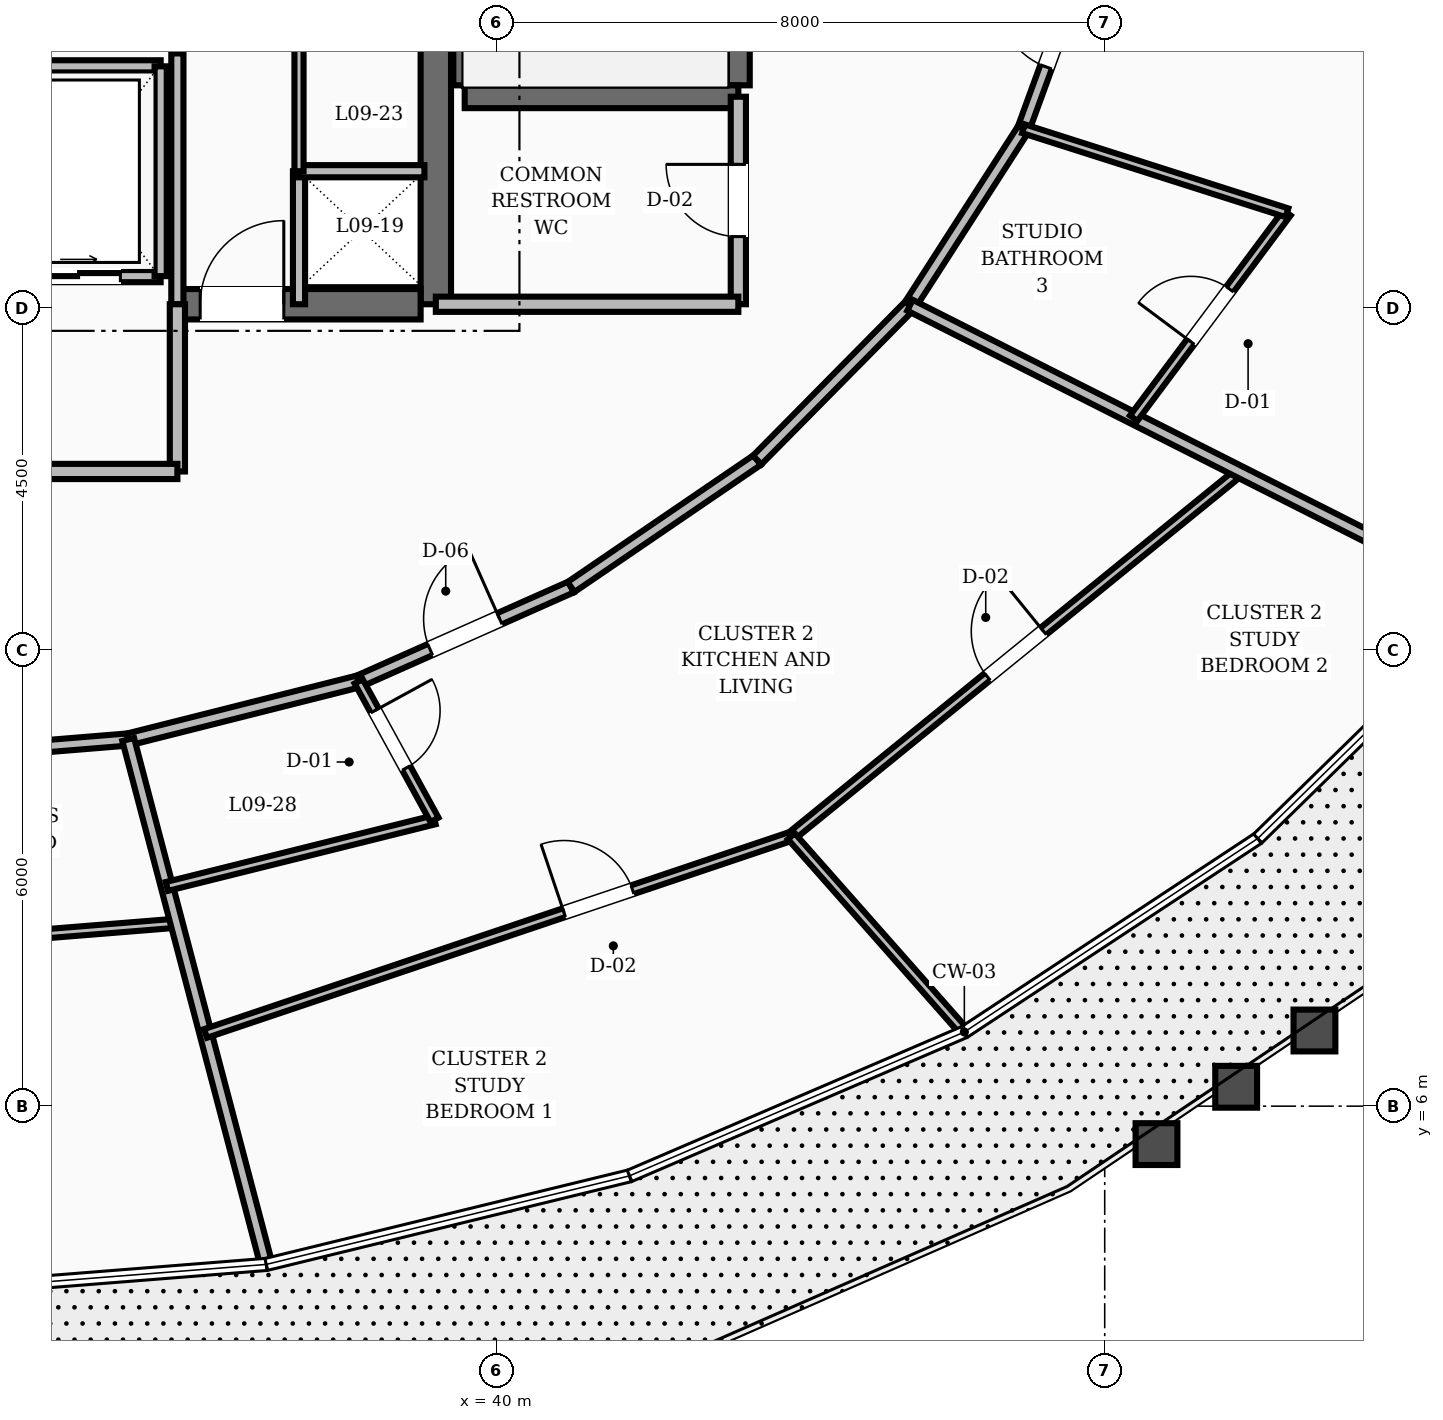
"""IFC4 building model, lengths in metres.
Left out: names, types, materials, properties, quantities, classifications, styles, units other than length and angle.
Written with IfcOpenShell. Run it as: python <this file> out.ifc"""

import sys

from ifc_helpers import new_model, si_unit, direction, frame, frame_2d, origin, place, context, subcontext, project, spatial, rectangle, extrude, element, fill, save


model = new_model("IFC4")
c1 = context("Model", 3, precision=1e-05, world=origin(), true_north=direction((0.0, 1.0)))
c2 = subcontext(c1, "Body", "Model", "MODEL_VIEW")
j1 = project(units=[si_unit("LENGTHUNIT", "METRE"), si_unit("PLANEANGLEUNIT", "RADIAN")], contexts=[c1])
p1 = place(None, origin())
s1 = spatial("IfcSite", under=j1, at=p1, CompositionType="ELEMENT")
p2 = place(p1, origin())
s2 = spatial("IfcBuilding", under=s1, at=p2, CompositionType="ELEMENT")
p3 = place(p2, frame((0.0, 0.0, 41.2)))
s3 = spatial("IfcBuildingStorey", under=s2, at=p3, CompositionType="ELEMENT", Elevation=41.2)
p4 = place(p3, frame((39.2, 16.55, 0.0), z_axis=(0.0, 0.0, 1.0), x_axis=(0.0, 1.0, 0.0)))
e1 = element("IfcWall", 1, at=p4, inside=s3, PredefinedType="SHEAR", context=c2, shape_type="SweptSolid", body=[
    extrude(rectangle(XDim=6.3, YDim=0.4, at=frame_2d((3.15, 0.0))), origin(), (0.0, 0.0, 1.0), 3.6),
])
p5 = place(p3, frame((35.8, 16.55, 0.0), z_axis=(0.0, 0.0, 1.0), x_axis=(1.0, 0.0, 0.0)))
e2 = element("IfcWall", 2, at=p5, inside=s3, PredefinedType="SHEAR", context=c2, shape_type="SweptSolid", body=[
    extrude(rectangle(XDim=3.2, YDim=0.4, at=frame_2d((1.6, 0.0))), origin(), (0.0, 0.0, 1.0), 3.6),
])
p6 = place(p5, frame((0.3, 0.0, 0.0)))
e3 = element("IfcOpeningElement", 3, at=p6, cuts=e2, PredefinedType="OPENING", context=c2, shape_type="SweptSolid", body=[
    extrude(rectangle(XDim=1.1, YDim=2.1, at=frame_2d((0.55, 1.05))), frame((0.0, 0.21, 0.0), z_axis=(0.0, -1.0, 0.0), x_axis=(1.0, 0.0, 0.0)), (0.0, 0.0, 1.0), 0.42),
])
for number, where, z_axis, x_axis in (
    (4, (43.18, 19.43, 0.0), (0.0, 0.0, 1.0), (0.0, 1.0, 0.0)),
    (5, (39.58, 19.43, 0.0), (0.0, 0.0, 1.0), (0.0, 1.0, 0.0)),
):
    element("IfcWall", number, at=place(p3, frame(where, z_axis=z_axis, x_axis=x_axis)), inside=s3, PredefinedType="SHEAR", context=c2, shape_type="SweptSolid", body=[
        extrude(rectangle(XDim=8.74, YDim=0.3, at=frame_2d((4.37, 0.0))), origin(), (0.0, 0.0, 1.0), 3.6),
    ])
p7 = place(p3, frame((39.58, 19.28, 0.0), z_axis=(0.0, 0.0, 1.0), x_axis=(1.0, 0.0, 0.0)))
e6 = element("IfcWall", 6, at=p7, inside=s3, PredefinedType="SHEAR", context=c2, shape_type="SweptSolid", body=[
    extrude(rectangle(XDim=3.6, YDim=0.3, at=frame_2d((1.8, 0.0))), origin(), (0.0, 0.0, 1.0), 3.6),
])
p8 = place(p3, frame((43.18, 16.55, 0.0), z_axis=(0.0, 0.0, 1.0), x_axis=(0.0, 1.0, 0.0)))
e7 = element("IfcWall", 7, at=p8, inside=s3, PredefinedType="SOLIDWALL", context=c2, shape_type="SweptSolid", body=[
    extrude(rectangle(XDim=2.73, YDim=0.2, at=frame_2d((1.365, 0.0))), origin(), (0.0, 0.0, 1.0), 2.61),
])
p9 = place(p8, frame((0.89, 0.0, 0.0)))
e8 = element("IfcOpeningElement", 8, at=p9, cuts=e7, PredefinedType="OPENING", context=c2, shape_type="SweptSolid", body=[
    extrude(rectangle(XDim=0.95, YDim=2.1, at=frame_2d((0.475, 1.05))), frame((0.0, 0.11, 0.0), z_axis=(0.0, -1.0, 0.0), x_axis=(1.0, 0.0, 0.0)), (0.0, 0.0, 1.0), 0.22),
])
p10 = place(p3, frame((39.2, 16.55, 0.0), z_axis=(0.0, 0.0, 1.0), x_axis=(1.0, 0.0, 0.0)))
e9 = element("IfcWall", 9, at=p10, inside=s3, PredefinedType="SOLIDWALL", context=c2, shape_type="SweptSolid", body=[
    extrude(rectangle(XDim=3.98, YDim=0.2, at=frame_2d((1.99, 0.0))), origin(), (0.0, 0.0, 1.0), 2.61),
])
p11 = place(p3, frame((35.8, 16.55, 0.0), z_axis=(0.0, 0.0, 1.0), x_axis=(0.0, 1.0, 0.0)))
e10 = element("IfcWall", 10, at=p11, inside=s3, PredefinedType="SOLIDWALL", context=c2, shape_type="SweptSolid", body=[
    extrude(rectangle(XDim=3.3, YDim=0.16, at=frame_2d((1.65, 0.0))), origin(), (0.0, 0.0, 1.0), 2.61),
])
p12 = place(p3, frame((37.4, 16.55, 0.0), z_axis=(0.0, 0.0, 1.0), x_axis=(0.0, 1.0, 0.0)))
e11 = element("IfcWall", 11, at=p12, inside=s3, PredefinedType="SOLIDWALL", context=c2, shape_type="SweptSolid", body=[
    extrude(rectangle(XDim=1.75, YDim=0.16, at=frame_2d((0.875, 0.0))), origin(), (0.0, 0.0, 1.0), 2.61),
])
p13 = place(p3, frame((35.8, 14.35, 0.0), z_axis=(0.0, 0.0, 1.0), x_axis=(0.0, 1.0, 0.0)))
e12 = element("IfcWall", 12, at=p13, inside=s3, PredefinedType="SOLIDWALL", context=c2, shape_type="SweptSolid", body=[
    extrude(rectangle(XDim=2.2, YDim=0.2, at=frame_2d((1.1, 0.0))), origin(), (0.0, 0.0, 1.0), 2.61),
])
p14 = place(p3, frame((28.2, 14.35, 0.0), z_axis=(0.0, 0.0, 1.0), x_axis=(1.0, 0.0, 0.0)))
e13 = element("IfcWall", 13, at=p14, inside=s3, PredefinedType="SOLIDWALL", context=c2, shape_type="SweptSolid", body=[
    extrude(rectangle(XDim=7.6, YDim=0.2, at=frame_2d((3.8, 0.0))), origin(), (0.0, 0.0, 1.0), 2.61),
])
p15 = place(p14, frame((3.2, 0.0, 0.0)))
e14 = element("IfcOpeningElement", 14, at=p15, cuts=e13, PredefinedType="OPENING", context=c2, shape_type="SweptSolid", body=[
    extrude(rectangle(XDim=1.2, YDim=2.1, at=frame_2d((0.6, 1.05))), frame((0.0, 0.11, 0.0), z_axis=(0.0, -1.0, 0.0), x_axis=(1.0, 0.0, 0.0)), (0.0, 0.0, 1.0), 0.22),
])
p16 = place(p3, frame((28.42, 16.92, 0.0), z_axis=(0.0, 0.0, 1.0), x_axis=(1.0, 0.0, 0.0)))
e15 = element("IfcWall", 15, at=p16, inside=s3, PredefinedType="SOLIDWALL", context=c2, shape_type="SweptSolid", body=[
    extrude(rectangle(XDim=7.16, YDim=0.16, at=frame_2d((3.58, 0.0))), origin(), (0.0, 0.0, 1.0), 2.61),
])
p17 = place(p16, frame((0.53, 0.0, 0.0)))
e16 = element("IfcOpeningElement", 16, at=p17, cuts=e15, PredefinedType="OPENING", context=c2, shape_type="SweptSolid", body=[
    extrude(rectangle(XDim=1.1, YDim=2.15, at=frame_2d((0.55, 1.075))), frame((0.0, 0.09, 0.0), z_axis=(0.0, -1.0, 0.0), x_axis=(1.0, 0.0, 0.0)), (0.0, 0.0, 1.0), 0.18),
])
p18 = place(p16, frame((3.03, 0.0, 0.0)))
e17 = element("IfcOpeningElement", 17, at=p18, cuts=e15, PredefinedType="OPENING", context=c2, shape_type="SweptSolid", body=[
    extrude(rectangle(XDim=1.1, YDim=2.15, at=frame_2d((0.55, 1.075))), frame((0.0, 0.09, 0.0), z_axis=(0.0, -1.0, 0.0), x_axis=(1.0, 0.0, 0.0)), (0.0, 0.0, 1.0), 0.18),
])
p19 = place(p16, frame((5.53, 0.0, 0.0)))
e18 = element("IfcOpeningElement", 18, at=p19, cuts=e15, PredefinedType="OPENING", context=c2, shape_type="SweptSolid", body=[
    extrude(rectangle(XDim=1.1, YDim=2.15, at=frame_2d((0.55, 1.075))), frame((0.0, 0.09, 0.0), z_axis=(0.0, -1.0, 0.0), x_axis=(1.0, 0.0, 0.0)), (0.0, 0.0, 1.0), 0.18),
])
p20 = place(p3, frame((28.42, 19.68, 0.0), z_axis=(0.0, 0.0, 1.0), x_axis=(1.0, 0.0, 0.0)))
e19 = element("IfcWall", 19, at=p20, inside=s3, PredefinedType="SOLIDWALL", context=c2, shape_type="SweptSolid", body=[
    extrude(rectangle(XDim=7.16, YDim=0.16, at=frame_2d((3.58, 0.0))), origin(), (0.0, 0.0, 1.0), 2.61),
])
p21 = place(p3, frame((35.58, 16.92, 0.0), z_axis=(0.0, 0.0, 1.0), x_axis=(0.0, 1.0, 0.0)))
e20 = element("IfcWall", 20, at=p21, inside=s3, PredefinedType="SOLIDWALL", context=c2, shape_type="SweptSolid", body=[
    extrude(rectangle(XDim=2.76, YDim=0.16, at=frame_2d((1.38, 0.0))), origin(), (0.0, 0.0, 1.0), 2.61),
])
p22 = place(p3, frame((37.4, 18.3, 0.0), z_axis=(0.0, 0.0, 1.0), x_axis=(1.0, 0.0, 0.0)))
e21 = element("IfcWall", 21, at=p22, inside=s3, PredefinedType="SOLIDWALL", context=c2, shape_type="SweptSolid", body=[
    extrude(rectangle(XDim=1.65, YDim=0.16, at=frame_2d((0.825, 0.0))), origin(), (0.0, 0.0, 1.0), 2.61),
])
p23 = place(p3, frame((37.4, 18.3, 0.0), z_axis=(0.0, 0.0, 1.0), x_axis=(0.0, 1.0, 0.0)))
e22 = element("IfcWall", 22, at=p23, inside=s3, PredefinedType="PARTITIONING", context=c2, shape_type="SweptSolid", body=[
    extrude(rectangle(XDim=4.45, YDim=0.12, at=frame_2d((2.225, 0.0))), origin(), (0.0, 0.0, 1.0), 2.61),
])
p24 = place(p23, frame((1.75, 0.0, 0.0)))
e23 = element("IfcOpeningElement", 23, at=p24, cuts=e22, PredefinedType="OPENING", context=c2, shape_type="SweptSolid", body=[
    extrude(rectangle(XDim=0.95, YDim=2.1, at=frame_2d((0.475, 1.05))), frame((0.0, 0.07, 0.0), z_axis=(0.0, -1.0, 0.0), x_axis=(1.0, 0.0, 0.0)), (0.0, 0.0, 1.0), 0.14),
])
p25 = place(p3, frame((32.0, 10.566, 0.0), z_axis=(0.0, 0.0, 1.0), x_axis=(0.996661331307, 0.081646743207, 0.0)))
e24 = element("IfcWall", 24, at=p25, inside=s3, PredefinedType="SOLIDWALL", context=c2, shape_type="SweptSolid", body=[
    extrude(rectangle(XDim=3.164, YDim=0.16, at=frame_2d((1.582, 0.0))), origin(), (0.0, 0.0, 1.0), 2.61),
])
p26 = place(p3, frame((35.153, 10.824, 0.0), z_axis=(0.0, 0.0, 1.0), x_axis=(0.969653665365, 0.244482656326, 0.0)))
e25 = element("IfcWall", 25, at=p26, inside=s3, PredefinedType="SOLIDWALL", context=c2, shape_type="SweptSolid", body=[
    extrude(rectangle(XDim=3.127, YDim=0.16, at=frame_2d((1.563, 0.0))), origin(), (0.0, 0.0, 1.0), 2.61),
])
p27 = place(p3, frame((38.185, 11.589, 0.0), z_axis=(0.0, 0.0, 1.0), x_axis=(0.913860932409, 0.406027334321, 0.0)))
e26 = element("IfcWall", 26, at=p27, inside=s3, PredefinedType="SOLIDWALL", context=c2, shape_type="SweptSolid", body=[
    extrude(rectangle(XDim=3.058, YDim=0.16, at=frame_2d((1.529, 0.0))), origin(), (0.0, 0.0, 1.0), 2.61),
])
p28 = place(p27, frame((1.029, 0.0, 0.0)))
e27 = element("IfcOpeningElement", 27, at=p28, cuts=e26, PredefinedType="OPENING", context=c2, shape_type="SweptSolid", body=[
    extrude(rectangle(XDim=1.0, YDim=2.1, at=frame_2d((0.5, 1.05))), frame((0.0, 0.09, 0.0), z_axis=(0.0, -1.0, 0.0), x_axis=(1.0, 0.0, 0.0)), (0.0, 0.0, 1.0), 0.18),
])
p29 = place(p3, frame((40.979, 12.83, 0.0), z_axis=(0.0, 0.0, 1.0), x_axis=(0.826112340767, 0.563505457323, 0.0)))
e28 = element("IfcWall", 28, at=p29, inside=s3, PredefinedType="SOLIDWALL", context=c2, shape_type="SweptSolid", body=[
    extrude(rectangle(XDim=2.965, YDim=0.16, at=frame_2d((1.482, 0.0))), origin(), (0.0, 0.0, 1.0), 2.61),
])
p30 = place(p3, frame((43.428, 14.501, 0.0), z_axis=(0.0, 0.0, 1.0), x_axis=(0.702569520063, 0.711615113301, 0.0)))
e29 = element("IfcWall", 29, at=p30, inside=s3, PredefinedType="SOLIDWALL", context=c2, shape_type="SweptSolid", body=[
    extrude(rectangle(XDim=2.861, YDim=0.16, at=frame_2d((1.43, 0.0))), origin(), (0.0, 0.0, 1.0), 2.61),
])
p31 = place(p3, frame((45.438, 16.537, 0.0), z_axis=(0.0, 0.0, 1.0), x_axis=(0.540891657444, 0.841092274907, 0.0)))
e30 = element("IfcWall", 30, at=p31, inside=s3, PredefinedType="SOLIDWALL", context=c2, shape_type="SweptSolid", body=[
    extrude(rectangle(XDim=2.761, YDim=0.16, at=frame_2d((1.38, 0.0))), origin(), (0.0, 0.0, 1.0), 2.61),
])
p32 = place(p3, frame((46.932, 18.859, 0.0), z_axis=(0.0, 0.0, 1.0), x_axis=(0.342882618672, 0.939378257047, 0.0)))
e31 = element("IfcWall", 31, at=p32, inside=s3, PredefinedType="SOLIDWALL", context=c2, shape_type="SweptSolid", body=[
    extrude(rectangle(XDim=2.683, YDim=0.16, at=frame_2d((1.341, 0.0))), origin(), (0.0, 0.0, 1.0), 2.61),
])
p33 = place(p32, frame((0.866, 0.0, 0.0)))
e32 = element("IfcOpeningElement", 32, at=p33, cuts=e31, PredefinedType="OPENING", context=c2, shape_type="SweptSolid", body=[
    extrude(rectangle(XDim=0.95, YDim=2.1, at=frame_2d((0.475, 1.05))), frame((0.0, 0.09, 0.0), z_axis=(0.0, -1.0, 0.0), x_axis=(1.0, 0.0, 0.0)), (0.0, 0.0, 1.0), 0.18),
])
p34 = place(p3, frame((32.0, 8.102, 0.0), z_axis=(0.0, 0.0, 1.0), x_axis=(0.996766693578, 0.080350224477, 0.0)))
e33 = element("IfcWall", 33, at=p34, inside=s3, PredefinedType="PARTITIONING", context=c2, shape_type="SweptSolid", body=[
    extrude(rectangle(XDim=3.801, YDim=0.12, at=frame_2d((1.9, 0.0))), origin(), (0.0, 0.0, 1.0), 2.61),
])
p35 = place(p3, frame((35.153, 10.824, 0.0), z_axis=(0.0, 0.0, 1.0), x_axis=(0.254425512264, -0.967092373411, 0.0)))
e34 = element("IfcWall", 34, at=p35, inside=s3, PredefinedType="SOLIDWALL", context=c2, shape_type="SweptSolid", body=[
    extrude(rectangle(XDim=7.091, YDim=0.16, at=frame_2d((3.546, 0.0))), origin(), (0.0, 0.0, 1.0), 2.61),
])
p36 = place(p3, frame((35.662, 8.89, 0.0), z_axis=(0.0, 0.0, 1.0), x_axis=(0.970371623194, 0.241617286014, 0.0)))
e35 = element("IfcWall", 35, at=p36, inside=s3, PredefinedType="PARTITIONING", context=c2, shape_type="SweptSolid", body=[
    extrude(rectangle(XDim=3.628, YDim=0.12, at=frame_2d((1.814, 0.0))), origin(), (0.0, 0.0, 1.0), 2.61),
])
p37 = place(p3, frame((38.185, 11.589, 0.0), z_axis=(0.0, 0.0, 1.0), x_axis=(0.480514838023, -0.876986596499, 0.0)))
e36 = element("IfcWall", 36, at=p37, inside=s3, PredefinedType="PARTITIONING", context=c2, shape_type="SweptSolid", body=[
    extrude(rectangle(XDim=2.077, YDim=0.12, at=frame_2d((1.039, 0.0))), origin(), (0.0, 0.0, 1.0), 2.61),
])
p38 = place(p37, frame((0.44, 0.0, 0.0)))
e37 = element("IfcOpeningElement", 37, at=p38, cuts=e36, PredefinedType="OPENING", context=c2, shape_type="SweptSolid", body=[
    extrude(rectangle(XDim=0.86, YDim=2.1, at=frame_2d((0.43, 1.05))), frame((0.0, 0.07, 0.0), z_axis=(0.0, -1.0, 0.0), x_axis=(1.0, 0.0, 0.0)), (0.0, 0.0, 1.0), 0.14),
])
p39 = place(p3, frame((36.17, 6.957, 0.0), z_axis=(0.0, 0.0, 1.0), x_axis=(0.947721167357, 0.319099653625, 0.0)))
e38 = element("IfcWall", 38, at=p39, inside=s3, PredefinedType="PARTITIONING", context=c2, shape_type="SweptSolid", body=[
    extrude(rectangle(XDim=8.131, YDim=0.12, at=frame_2d((4.066, 0.0))), origin(), (0.0, 0.0, 1.0), 2.61),
])
p40 = place(p39, frame((4.977, 0.0, 0.0)))
e39 = element("IfcOpeningElement", 39, at=p40, cuts=e38, PredefinedType="OPENING", context=c2, shape_type="SweptSolid", body=[
    extrude(rectangle(XDim=0.95, YDim=2.1, at=frame_2d((0.475, 1.05))), frame((0.0, 0.07, 0.0), z_axis=(0.0, -1.0, 0.0), x_axis=(1.0, 0.0, 0.0)), (0.0, 0.0, 1.0), 0.14),
])
p41 = place(p3, frame((43.877, 9.552, 0.0), z_axis=(0.0, 0.0, 1.0), x_axis=(0.775978393893, 0.630759488404, 0.0)))
e40 = element("IfcWall", 40, at=p41, inside=s3, PredefinedType="PARTITIONING", context=c2, shape_type="SweptSolid", body=[
    extrude(rectangle(XDim=7.601, YDim=0.12, at=frame_2d((3.8, 0.0))), origin(), (0.0, 0.0, 1.0), 2.61),
])
p42 = place(p41, frame((3.325, 0.0, 0.0)))
e41 = element("IfcOpeningElement", 41, at=p42, cuts=e40, PredefinedType="OPENING", context=c2, shape_type="SweptSolid", body=[
    extrude(rectangle(XDim=0.95, YDim=2.1, at=frame_2d((0.475, 1.05))), frame((0.0, 0.07, 0.0), z_axis=(0.0, -1.0, 0.0), x_axis=(1.0, 0.0, 0.0)), (0.0, 0.0, 1.0), 0.14),
])
p43 = place(p3, frame((43.877, 9.552, 0.0), z_axis=(0.0, 0.0, 1.0), x_axis=(0.662205323819, -0.74932243334, 0.0)))
e42 = element("IfcWall", 42, at=p43, inside=s3, PredefinedType="PARTITIONING", context=c2, shape_type="SweptSolid", body=[
    extrude(rectangle(XDim=3.388, YDim=0.12, at=frame_2d((1.694, 0.0))), origin(), (0.0, 0.0, 1.0), 2.61),
])
p44 = place(p3, frame((45.438, 16.537, 0.0), z_axis=(0.0, 0.0, 1.0), x_axis=(0.892562807144, -0.450923092448, 0.0)))
e43 = element("IfcWall", 43, at=p44, inside=s3, PredefinedType="SOLIDWALL", context=c2, shape_type="SweptSolid", body=[
    extrude(rectangle(XDim=8.626, YDim=0.16, at=frame_2d((4.313, 0.0))), origin(), (0.0, 0.0, 1.0), 2.61),
])
p45 = place(p3, frame((48.381, 15.05, 0.0), z_axis=(0.0, 0.0, 1.0), x_axis=(0.597948418231, 0.801534583867, 0.0)))
e44 = element("IfcWall", 44, at=p45, inside=s3, PredefinedType="PARTITIONING", context=c2, shape_type="SweptSolid", body=[
    extrude(rectangle(XDim=3.373, YDim=0.12, at=frame_2d((1.687, 0.0))), origin(), (0.0, 0.0, 1.0), 2.61),
])
p46 = place(p45, frame((1.257, 0.0, 0.0)))
e45 = element("IfcOpeningElement", 45, at=p46, cuts=e44, PredefinedType="OPENING", context=c2, shape_type="SweptSolid", body=[
    extrude(rectangle(XDim=0.86, YDim=2.1, at=frame_2d((0.43, 1.05))), frame((0.0, 0.07, 0.0), z_axis=(0.0, -1.0, 0.0), x_axis=(1.0, 0.0, 0.0)), (0.0, 0.0, 1.0), 0.14),
])
p47 = place(p3, frame((46.932, 18.859, 0.0), z_axis=(0.0, 0.0, 1.0), x_axis=(0.952742297431, -0.303779714077, 0.0)))
e46 = element("IfcWall", 46, at=p47, inside=s3, PredefinedType="PARTITIONING", context=c2, shape_type="SweptSolid", body=[
    extrude(rectangle(XDim=3.638, YDim=0.12, at=frame_2d((1.819, 0.0))), origin(), (0.0, 0.0, 1.0), 2.61),
])
p48 = place(p3, frame((47.852, 21.379, 0.0), z_axis=(0.0, 0.0, 1.0), x_axis=(0.988476582303, -0.151373862468, 0.0)))
e47 = element("IfcWall", 47, at=p48, inside=s3, PredefinedType="SOLIDWALL", context=c2, shape_type="SweptSolid", body=[
    extrude(rectangle(XDim=9.746, YDim=0.16, at=frame_2d((4.873, 0.0))), origin(), (0.0, 0.0, 1.0), 2.61),
])
p49 = place(p9, origin())
e48 = element("IfcDoor", 48, at=p49, inside=s3, OperationType="SINGLE_SWING_RIGHT", PredefinedType="DOOR", context=c2, shape_type="SweptSolid", body=[
    extrude(rectangle(XDim=0.95, YDim=2.1, at=frame_2d((0.475, 1.05))), frame((0.0, 0.025, 0.0), z_axis=(0.0, -1.0, 0.0), x_axis=(1.0, 0.0, 0.0)), (0.0, 0.0, 1.0), 0.05),
])
fill(e8, e48)
p50 = place(p6, origin())
e49 = element("IfcDoor", 49, at=p50, inside=s3, OperationType="SINGLE_SWING_RIGHT", PredefinedType="DOOR", context=c2, shape_type="SweptSolid", body=[
    extrude(rectangle(XDim=1.1, YDim=2.1, at=frame_2d((0.55, 1.05))), frame((0.0, 0.025, 0.0), z_axis=(0.0, -1.0, 0.0), x_axis=(1.0, 0.0, 0.0)), (0.0, 0.0, 1.0), 0.05),
])
fill(e3, e49)
p51 = place(p19, origin())
e50 = element("IfcDoor", 50, at=p51, inside=s3, OperationType="SLIDING_TO_RIGHT", PredefinedType="DOOR", context=c2, shape_type="SweptSolid", body=[
    extrude(rectangle(XDim=1.1, YDim=2.15, at=frame_2d((0.55, 1.075))), frame((0.0, 0.025, 0.0), z_axis=(0.0, -1.0, 0.0), x_axis=(1.0, 0.0, 0.0)), (0.0, 0.0, 1.0), 0.05),
])
fill(e18, e50)
p52 = place(p38, origin())
e51 = element("IfcDoor", 51, at=p52, inside=s3, OperationType="SINGLE_SWING_LEFT", PredefinedType="DOOR", context=c2, shape_type="SweptSolid", body=[
    extrude(rectangle(XDim=0.86, YDim=2.1, at=frame_2d((0.43, 1.05))), frame((0.0, 0.025, 0.0), z_axis=(0.0, -1.0, 0.0), x_axis=(1.0, 0.0, 0.0)), (0.0, 0.0, 1.0), 0.05),
])
fill(e37, e51)
p53 = place(p28, origin())
e52 = element("IfcDoor", 52, at=p53, inside=s3, OperationType="SINGLE_SWING_RIGHT", PredefinedType="DOOR", context=c2, shape_type="SweptSolid", body=[
    extrude(rectangle(XDim=1.0, YDim=2.1, at=frame_2d((0.5, 1.05))), frame((0.0, 0.025, 0.0), z_axis=(0.0, -1.0, 0.0), x_axis=(1.0, 0.0, 0.0)), (0.0, 0.0, 1.0), 0.05),
])
fill(e27, e52)
p54 = place(p40, origin())
e53 = element("IfcDoor", 53, at=p54, inside=s3, OperationType="SINGLE_SWING_LEFT", PredefinedType="DOOR", context=c2, shape_type="SweptSolid", body=[
    extrude(rectangle(XDim=0.95, YDim=2.1, at=frame_2d((0.475, 1.05))), frame((0.0, 0.025, 0.0), z_axis=(0.0, -1.0, 0.0), x_axis=(1.0, 0.0, 0.0)), (0.0, 0.0, 1.0), 0.05),
])
fill(e39, e53)
p55 = place(p42, origin())
e54 = element("IfcDoor", 54, at=p55, inside=s3, OperationType="SINGLE_SWING_RIGHT", PredefinedType="DOOR", context=c2, shape_type="SweptSolid", body=[
    extrude(rectangle(XDim=0.95, YDim=2.1, at=frame_2d((0.475, 1.05))), frame((0.0, 0.025, 0.0), z_axis=(0.0, -1.0, 0.0), x_axis=(1.0, 0.0, 0.0)), (0.0, 0.0, 1.0), 0.05),
])
fill(e41, e54)
p56 = place(p46, origin())
e55 = element("IfcDoor", 55, at=p56, inside=s3, OperationType="SINGLE_SWING_LEFT", PredefinedType="DOOR", context=c2, shape_type="SweptSolid", body=[
    extrude(rectangle(XDim=0.86, YDim=2.1, at=frame_2d((0.43, 1.05))), frame((0.0, 0.025, 0.0), z_axis=(0.0, -1.0, 0.0), x_axis=(1.0, 0.0, 0.0)), (0.0, 0.0, 1.0), 0.05),
])
fill(e45, e55)
p57 = place(p33, origin())
e56 = element("IfcDoor", 56, at=p57, inside=s3, OperationType="SINGLE_SWING_RIGHT", PredefinedType="DOOR", context=c2, shape_type="SweptSolid", body=[
    extrude(rectangle(XDim=0.95, YDim=2.1, at=frame_2d((0.475, 1.05))), frame((0.0, 0.025, 0.0), z_axis=(0.0, -1.0, 0.0), x_axis=(1.0, 0.0, 0.0)), (0.0, 0.0, 1.0), 0.05),
])
fill(e32, e56)
save(model, sys.argv[1])
